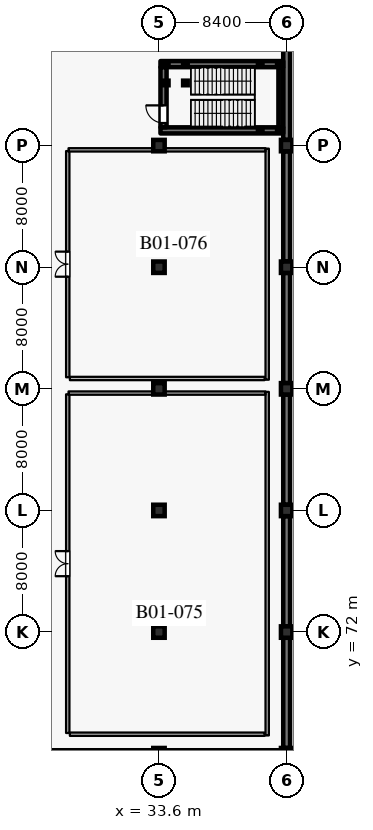
"""IFC4 building model, lengths in metres.
Left out: names, types, materials, properties, quantities, classifications, styles, units other than length and angle.
Written with IfcOpenShell. Run it as: python <this file> out.ifc"""

import sys

from ifc_helpers import new_model, si_unit, direction, frame, frame_2d, origin, origin_2d, place, context, subcontext, project, spatial, rectangle, hollow_rectangle, extrude, element, fill, save


model = new_model("IFC4")
c1 = context("Model", 3, precision=1e-05, world=origin(), true_north=direction((0.0, 1.0)))
c2 = subcontext(c1, "Body", "Model", "MODEL_VIEW")
j1 = project(units=[si_unit("LENGTHUNIT", "METRE"), si_unit("PLANEANGLEUNIT", "RADIAN")], contexts=[c1])
p1 = place(None, origin())
s1 = spatial("IfcSite", under=j1, at=p1, CompositionType="ELEMENT")
p2 = place(p1, origin())
s2 = spatial("IfcBuilding", under=s1, at=p2, CompositionType="ELEMENT")
p3 = place(p2, frame((0.0, 0.0, -5.4)))
s3 = spatial("IfcBuildingStorey", under=s2, at=p3, CompositionType="ELEMENT", Elevation=-5.4)
for number, where, z_axis, x_axis in (
    (1, (33.6, 64.0, 0.0), (0.0, 0.0, 1.0), (1.0, 0.0, 0.0)),
    (2, (33.6, 72.0, 0.0), (0.0, 0.0, 1.0), (1.0, 0.0, 0.0)),
    (3, (33.6, 80.0, 0.0), (0.0, 0.0, 1.0), (1.0, 0.0, 0.0)),
    (4, (33.6, 88.0, 0.0), (0.0, 0.0, 1.0), (1.0, 0.0, 0.0)),
    (5, (33.6, 96.0, 0.0), (0.0, 0.0, 1.0), (1.0, 0.0, 0.0)),
    (6, (33.6, 104.0, 0.0), (0.0, 0.0, 1.0), (1.0, 0.0, 0.0)),
    (7, (42.0, 64.0, 0.0), (0.0, 0.0, 1.0), (1.0, 0.0, 0.0)),
    (8, (42.0, 72.0, 0.0), (0.0, 0.0, 1.0), (1.0, 0.0, 0.0)),
    (9, (42.0, 80.0, 0.0), (0.0, 0.0, 1.0), (1.0, 0.0, 0.0)),
    (10, (42.0, 88.0, 0.0), (0.0, 0.0, 1.0), (1.0, 0.0, 0.0)),
    (11, (42.0, 96.0, 0.0), (0.0, 0.0, 1.0), (1.0, 0.0, 0.0)),
    (12, (42.0, 104.0, 0.0), (0.0, 0.0, 1.0), (1.0, 0.0, 0.0)),
):
    element("IfcColumn", number, at=place(p3, frame(where, z_axis=z_axis, x_axis=x_axis)), inside=s3, PredefinedType="COLUMN", context=c2, shape_type="SweptSolid", body=[
        extrude(rectangle(XDim=0.75, YDim=0.75, at=origin_2d()), origin(), (0.0, 0.0, 1.0), 5.4),
    ])
p4 = place(p3, frame((41.625, 64.0, 0.0), z_axis=(0.0, 0.0, 1.0), x_axis=(-1.0, 0.0, 0.0)))
e13 = element("IfcWall", 13, at=p4, inside=s3, PredefinedType="USERDEFINED", context=c2, shape_type="SweptSolid", body=[
    extrude(rectangle(XDim=7.65, YDim=0.45, at=frame_2d((3.825, 0.0))), origin(), (0.0, 0.0, 1.0), 4.3),
])
p5 = place(p3, frame((33.225, 64.0, 0.0), z_axis=(0.0, 0.0, 1.0), x_axis=(-1.0, 0.0, 0.0)))
e14 = element("IfcWall", 14, at=p5, inside=s3, PredefinedType="USERDEFINED", context=c2, shape_type="SweptSolid", body=[
    extrude(rectangle(XDim=7.65, YDim=0.45, at=frame_2d((3.825, 0.0))), origin(), (0.0, 0.0, 1.0), 4.3),
])
for number, where, z_axis, x_axis in (
    (15, (42.0, 111.625, 0.0), (0.0, 0.0, 1.0), (0.0, -1.0, 0.0)),
    (16, (42.0, 103.625, 0.0), (0.0, 0.0, 1.0), (0.0, -1.0, 0.0)),
    (17, (42.0, 95.625, 0.0), (0.0, 0.0, 1.0), (0.0, -1.0, 0.0)),
    (18, (42.0, 87.625, 0.0), (0.0, 0.0, 1.0), (0.0, -1.0, 0.0)),
    (19, (42.0, 79.625, 0.0), (0.0, 0.0, 1.0), (0.0, -1.0, 0.0)),
    (20, (42.0, 71.625, 0.0), (0.0, 0.0, 1.0), (0.0, -1.0, 0.0)),
):
    element("IfcWall", number, at=place(p3, frame(where, z_axis=z_axis, x_axis=x_axis)), inside=s3, PredefinedType="USERDEFINED", context=c2, shape_type="SweptSolid", body=[
        extrude(rectangle(XDim=7.25, YDim=0.45, at=frame_2d((3.625, 0.0))), origin(), (0.0, 0.0, 1.0), 4.3),
    ])
p6 = place(p3, frame((33.7, 105.0, 0.0), z_axis=(0.0, 0.0, 1.0), x_axis=(1.0, 0.0, 0.0)))
e21 = element("IfcWall", 21, at=p6, inside=s3, PredefinedType="SHEAR", context=c2, shape_type="SweptSolid", body=[
    extrude(rectangle(XDim=8.075, YDim=0.4, at=frame_2d((4.038, 0.0))), origin(), (0.0, 0.0, 1.0), 4.995),
])
p7 = place(p3, frame((41.61, 105.205, 0.0), z_axis=(0.0, 0.0, 1.0), x_axis=(0.0, 1.0, 0.0)))
e22 = element("IfcWall", 22, at=p7, inside=s3, PredefinedType="SHEAR", context=c2, shape_type="SweptSolid", body=[
    extrude(rectangle(XDim=3.95, YDim=0.3, at=frame_2d((1.975, 0.0))), origin(), (0.0, 0.0, 1.0), 4.995),
])
p8 = place(p3, frame((33.7, 109.36, 0.0), z_axis=(0.0, 0.0, 1.0), x_axis=(1.0, 0.0, 0.0)))
e23 = element("IfcWall", 23, at=p8, inside=s3, PredefinedType="SHEAR", context=c2, shape_type="SweptSolid", body=[
    extrude(rectangle(XDim=8.075, YDim=0.4, at=frame_2d((4.038, 0.0))), origin(), (0.0, 0.0, 1.0), 4.995),
])
p9 = place(p3, frame((33.9, 105.205, 0.0), z_axis=(0.0, 0.0, 1.0), x_axis=(0.0, 1.0, 0.0)))
e24 = element("IfcWall", 24, at=p9, inside=s3, PredefinedType="SHEAR", context=c2, shape_type="SweptSolid", body=[
    extrude(rectangle(XDim=3.95, YDim=0.4, at=frame_2d((1.975, 0.0))), origin(), (0.0, 0.0, 1.0), 4.995),
])
p10 = place(p9, frame((0.28, 0.0, 0.0)))
e25 = element("IfcOpeningElement", 25, at=p10, cuts=e24, PredefinedType="OPENING", context=c2, shape_type="SweptSolid", body=[
    extrude(rectangle(XDim=1.16, YDim=2.2, at=frame_2d((0.58, 1.1))), frame((0.0, 0.21, 0.0), z_axis=(0.0, -1.0, 0.0), x_axis=(1.0, 0.0, 0.0)), (0.0, 0.0, 1.0), 0.42),
])
for number, where, z_axis, x_axis in (
    (26, (34.08, 108.12, 0.0), (0.0, 0.0, 1.0), (1.0, 0.0, 0.0)),
    (27, (34.08, 109.36, 0.0), (0.0, 0.0, 1.0), (1.0, 0.0, 0.0)),
    (28, (35.34, 108.12, 0.0), (0.0, 0.0, 1.0), (1.0, 0.0, 0.0)),
    (29, (35.34, 109.36, 0.0), (0.0, 0.0, 1.0), (1.0, 0.0, 0.0)),
):
    element("IfcColumn", number, at=place(p3, frame(where, z_axis=z_axis, x_axis=x_axis)), inside=s3, PredefinedType="COLUMN", context=c2, shape_type="SweptSolid", body=[
        extrude(hollow_rectangle(XDim=0.3, YDim=0.3, WallThickness=0.012, at=origin_2d()), origin(), (0.0, 0.0, 1.0), 5.22),
    ])
for number, where, z_axis, x_axis in (
    (30, (40.26, 105.0, 0.0), (0.0, 0.0, 1.0), (1.0, 0.0, 0.0)),
    (31, (40.26, 109.36, 0.0), (0.0, 0.0, 1.0), (1.0, 0.0, 0.0)),
    (32, (41.52, 105.0, 0.0), (0.0, 0.0, 1.0), (1.0, 0.0, 0.0)),
    (33, (41.52, 109.36, 0.0), (0.0, 0.0, 1.0), (1.0, 0.0, 0.0)),
):
    element("IfcColumn", number, at=place(p3, frame(where, z_axis=z_axis, x_axis=x_axis)), inside=s3, PredefinedType="COLUMN", context=c2, shape_type="SweptSolid", body=[
        extrude(hollow_rectangle(XDim=0.3, YDim=0.3, WallThickness=0.012, at=origin_2d()), origin(), (0.0, 0.0, 1.0), 2.52),
    ])
p11 = place(p3, frame((27.6, 65.36, 0.0), z_axis=(0.0, 0.0, 1.0), x_axis=(0.0, 1.0, 0.0)))
e34 = element("IfcWall", 34, at=p11, inside=s3, PredefinedType="PARTITIONING", context=c2, shape_type="SweptSolid", body=[
    extrude(rectangle(XDim=22.28, YDim=0.22, at=frame_2d((11.14, 0.0))), origin(), (0.0, 0.0, 1.0), 4.995),
])
p12 = place(p11, frame((10.315, 0.0, 0.0)))
e35 = element("IfcOpeningElement", 35, at=p12, cuts=e34, PredefinedType="OPENING", context=c2, shape_type="SweptSolid", body=[
    extrude(rectangle(XDim=1.65, YDim=2.4, at=frame_2d((0.825, 1.2))), frame((0.0, 0.12, 0.0), z_axis=(0.0, -1.0, 0.0), x_axis=(1.0, 0.0, 0.0)), (0.0, 0.0, 1.0), 0.24),
])
p13 = place(p3, frame((27.74, 65.28, 0.0), z_axis=(0.0, 0.0, 1.0), x_axis=(1.0, 0.0, 0.0)))
e36 = element("IfcWall", 36, at=p13, inside=s3, PredefinedType="PARTITIONING", context=c2, shape_type="SweptSolid", body=[
    extrude(rectangle(XDim=12.81, YDim=0.22, at=frame_2d((6.405, 0.0))), origin(), (0.0, 0.0, 1.0), 4.995),
])
p14 = place(p3, frame((27.6, 88.76, 0.0), z_axis=(0.0, 0.0, 1.0), x_axis=(0.0, 1.0, 0.0)))
e37 = element("IfcWall", 37, at=p14, inside=s3, PredefinedType="PARTITIONING", context=c2, shape_type="SweptSolid", body=[
    extrude(rectangle(XDim=14.88, YDim=0.22, at=frame_2d((7.44, 0.0))), origin(), (0.0, 0.0, 1.0), 4.995),
])
p15 = place(p14, frame((6.615, 0.0, 0.0)))
e38 = element("IfcOpeningElement", 38, at=p15, cuts=e37, PredefinedType="OPENING", context=c2, shape_type="SweptSolid", body=[
    extrude(rectangle(XDim=1.65, YDim=2.4, at=frame_2d((0.825, 1.2))), frame((0.0, 0.12, 0.0), z_axis=(0.0, -1.0, 0.0), x_axis=(1.0, 0.0, 0.0)), (0.0, 0.0, 1.0), 0.24),
])
p16 = place(p3, frame((27.74, 88.68, 0.0), z_axis=(0.0, 0.0, 1.0), x_axis=(1.0, 0.0, 0.0)))
e39 = element("IfcWall", 39, at=p16, inside=s3, PredefinedType="PARTITIONING", context=c2, shape_type="SweptSolid", body=[
    extrude(rectangle(XDim=12.81, YDim=0.22, at=frame_2d((6.405, 0.0))), origin(), (0.0, 0.0, 1.0), 4.995),
])
p17 = place(p3, frame((40.72, 65.2, 0.0), z_axis=(0.0, 0.0, 1.0), x_axis=(0.0, 1.0, 0.0)))
e40 = element("IfcWall", 40, at=p17, inside=s3, PredefinedType="PARTITIONING", context=c2, shape_type="SweptSolid", body=[
    extrude(rectangle(XDim=22.6, YDim=0.22, at=frame_2d((11.3, 0.0))), origin(), (0.0, 0.0, 1.0), 4.995),
])
p18 = place(p3, frame((27.652, 87.72, 0.0), z_axis=(0.0, 0.0, 1.0), x_axis=(1.0, 0.0, 0.0)))
e41 = element("IfcWall", 41, at=p18, inside=s3, PredefinedType="PARTITIONING", context=c2, shape_type="SweptSolid", body=[
    extrude(rectangle(XDim=5.573, YDim=0.22, at=frame_2d((2.787, 0.0))), origin(), (0.0, 0.0, 1.0), 4.2),
])
p19 = place(p3, frame((33.975, 87.72, 0.0), z_axis=(0.0, 0.0, 1.0), x_axis=(1.0, 0.0, 0.0)))
e42 = element("IfcWall", 42, at=p19, inside=s3, PredefinedType="PARTITIONING", context=c2, shape_type="SweptSolid", body=[
    extrude(rectangle(XDim=6.635, YDim=0.22, at=frame_2d((3.317, 0.0))), origin(), (0.0, 0.0, 1.0), 4.15),
])
p20 = place(p3, frame((40.72, 88.6, 0.0), z_axis=(0.0, 0.0, 1.0), x_axis=(0.0, 1.0, 0.0)))
e43 = element("IfcWall", 43, at=p20, inside=s3, PredefinedType="PARTITIONING", context=c2, shape_type="SweptSolid", body=[
    extrude(rectangle(XDim=15.2, YDim=0.22, at=frame_2d((7.6, 0.0))), origin(), (0.0, 0.0, 1.0), 4.995),
])
p21 = place(p3, frame((27.652, 103.72, 0.0), z_axis=(0.0, 0.0, 1.0), x_axis=(1.0, 0.0, 0.0)))
e44 = element("IfcWall", 44, at=p21, inside=s3, PredefinedType="PARTITIONING", context=c2, shape_type="SweptSolid", body=[
    extrude(rectangle(XDim=5.573, YDim=0.22, at=frame_2d((2.787, 0.0))), origin(), (0.0, 0.0, 1.0), 4.2),
])
p22 = place(p3, frame((33.975, 103.72, 0.0), z_axis=(0.0, 0.0, 1.0), x_axis=(1.0, 0.0, 0.0)))
e45 = element("IfcWall", 45, at=p22, inside=s3, PredefinedType="PARTITIONING", context=c2, shape_type="SweptSolid", body=[
    extrude(rectangle(XDim=6.635, YDim=0.22, at=frame_2d((3.317, 0.0))), origin(), (0.0, 0.0, 1.0), 4.15),
])
p23 = place(p10, origin())
e46 = element("IfcDoor", 46, at=p23, inside=s3, OperationType="SINGLE_SWING_RIGHT", PredefinedType="DOOR", context=c2, shape_type="SweptSolid", body=[
    extrude(rectangle(XDim=1.16, YDim=2.2, at=frame_2d((0.58, 1.1))), frame((0.0, 0.025, 0.0), z_axis=(0.0, -1.0, 0.0), x_axis=(1.0, 0.0, 0.0)), (0.0, 0.0, 1.0), 0.05),
])
fill(e25, e46)
p24 = place(p12, origin())
e47 = element("IfcDoor", 47, at=p24, inside=s3, OperationType="DOUBLE_DOOR_SINGLE_SWING", PredefinedType="DOOR", context=c2, shape_type="SweptSolid", body=[
    extrude(rectangle(XDim=1.65, YDim=2.4, at=frame_2d((0.825, 1.2))), frame((0.0, 0.025, 0.0), z_axis=(0.0, -1.0, 0.0), x_axis=(1.0, 0.0, 0.0)), (0.0, 0.0, 1.0), 0.05),
])
fill(e35, e47)
p25 = place(p15, origin())
e48 = element("IfcDoor", 48, at=p25, inside=s3, OperationType="DOUBLE_DOOR_SINGLE_SWING", PredefinedType="DOOR", context=c2, shape_type="SweptSolid", body=[
    extrude(rectangle(XDim=1.65, YDim=2.4, at=frame_2d((0.825, 1.2))), frame((0.0, 0.025, 0.0), z_axis=(0.0, -1.0, 0.0), x_axis=(1.0, 0.0, 0.0)), (0.0, 0.0, 1.0), 0.05),
])
fill(e38, e48)
save(model, sys.argv[1])
